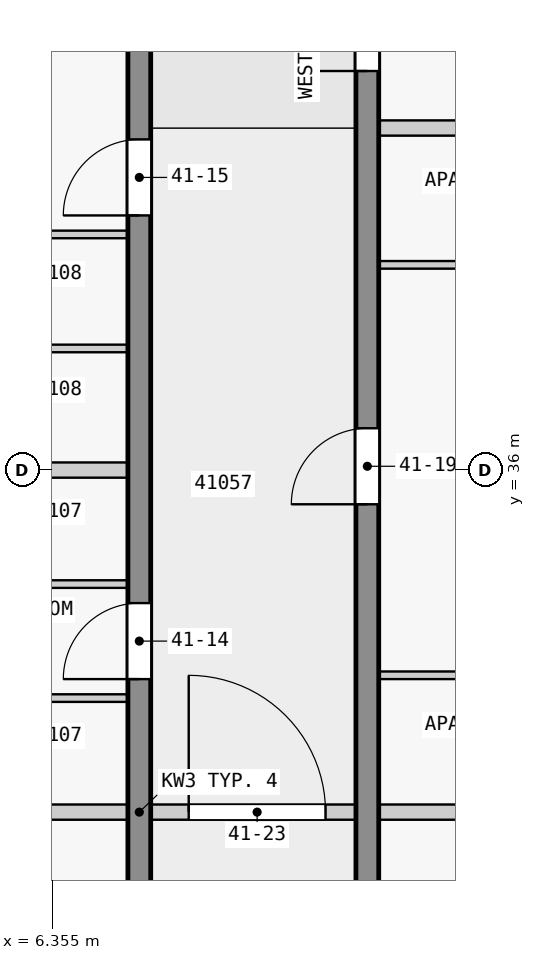
"""IFC4 building model, lengths in metres.
Left out: names, types, materials, properties, quantities, classifications, styles, units other than length and angle.
Written with IfcOpenShell. Run it as: python <this file> out.ifc"""

import sys

from ifc_helpers import new_model, si_unit, direction, frame, frame_2d, origin, place, context, subcontext, project, spatial, rectangle, extrude, element, fill, save


model = new_model("IFC4")
c1 = context("Model", 3, precision=1e-05, world=origin(), true_north=direction((0.0, 1.0)))
c2 = subcontext(c1, "Body", "Model", "MODEL_VIEW")
j1 = project(units=[si_unit("LENGTHUNIT", "METRE"), si_unit("PLANEANGLEUNIT", "RADIAN")], contexts=[c1])
p1 = place(None, origin())
s1 = spatial("IfcSite", under=j1, at=p1, CompositionType="ELEMENT")
p2 = place(p1, origin())
s2 = spatial("IfcBuilding", under=s1, at=p2, CompositionType="ELEMENT")
p3 = place(p2, frame((0.0, 0.0, 160.4)))
s3 = spatial("IfcBuildingStorey", under=s2, at=p3, CompositionType="ELEMENT", Elevation=160.4)
p4 = place(p3, frame((7.5, 18.0, 0.0), z_axis=(0.0, 0.0, 1.0), x_axis=(0.0, 1.0, 0.0)))
e1 = element("IfcWall", 1, at=p4, inside=s3, PredefinedType="SHEAR", context=c2, shape_type="SweptSolid", body=[
    extrude(rectangle(XDim=27.0, YDim=0.3, at=frame_2d((13.5, 0.0))), origin(), (0.0, 0.0, 1.0), 3.25),
])
p5 = place(p4, frame((1.75, 0.0, 0.0)))
e2 = element("IfcOpeningElement", 2, at=p5, cuts=e1, PredefinedType="OPENING", context=c2, shape_type="SweptSolid", body=[
    extrude(rectangle(XDim=1.0, YDim=2.1, at=frame_2d((0.5, 1.05))), frame((0.0, 0.16, 0.0), z_axis=(0.0, -1.0, 0.0), x_axis=(1.0, 0.0, 0.0)), (0.0, 0.0, 1.0), 0.32),
])
p6 = place(p4, frame((6.25, 0.0, 0.0)))
e3 = element("IfcOpeningElement", 3, at=p6, cuts=e1, PredefinedType="OPENING", context=c2, shape_type="SweptSolid", body=[
    extrude(rectangle(XDim=1.0, YDim=2.1, at=frame_2d((0.5, 1.05))), frame((0.0, 0.16, 0.0), z_axis=(0.0, -1.0, 0.0), x_axis=(1.0, 0.0, 0.0)), (0.0, 0.0, 1.0), 0.32),
])
p7 = place(p4, frame((10.75, 0.0, 0.0)))
e4 = element("IfcOpeningElement", 4, at=p7, cuts=e1, PredefinedType="OPENING", context=c2, shape_type="SweptSolid", body=[
    extrude(rectangle(XDim=1.0, YDim=2.1, at=frame_2d((0.5, 1.05))), frame((0.0, 0.16, 0.0), z_axis=(0.0, -1.0, 0.0), x_axis=(1.0, 0.0, 0.0)), (0.0, 0.0, 1.0), 0.32),
])
p8 = place(p4, frame((15.25, 0.0, 0.0)))
e5 = element("IfcOpeningElement", 5, at=p8, cuts=e1, PredefinedType="OPENING", context=c2, shape_type="SweptSolid", body=[
    extrude(rectangle(XDim=1.0, YDim=2.1, at=frame_2d((0.5, 1.05))), frame((0.0, 0.16, 0.0), z_axis=(0.0, -1.0, 0.0), x_axis=(1.0, 0.0, 0.0)), (0.0, 0.0, 1.0), 0.32),
])
p9 = place(p4, frame((21.35, 0.0, 0.0)))
e6 = element("IfcOpeningElement", 6, at=p9, cuts=e1, PredefinedType="OPENING", context=c2, shape_type="SweptSolid", body=[
    extrude(rectangle(XDim=1.0, YDim=2.1, at=frame_2d((0.5, 1.05))), frame((0.0, 0.16, 0.0), z_axis=(0.0, -1.0, 0.0), x_axis=(1.0, 0.0, 0.0)), (0.0, 0.0, 1.0), 0.32),
])
p10 = place(p3, frame((10.5, 18.0, 0.0), z_axis=(0.0, 0.0, 1.0), x_axis=(0.0, 1.0, 0.0)))
e7 = element("IfcWall", 7, at=p10, inside=s3, PredefinedType="SHEAR", context=c2, shape_type="SweptSolid", body=[
    extrude(rectangle(XDim=27.0, YDim=0.3, at=frame_2d((13.5, 0.0))), origin(), (0.0, 0.0, 1.0), 3.25),
])
p11 = place(p10, frame((1.75, 0.0, 0.0)))
e8 = element("IfcOpeningElement", 8, at=p11, cuts=e7, PredefinedType="OPENING", context=c2, shape_type="SweptSolid", body=[
    extrude(rectangle(XDim=1.0, YDim=2.1, at=frame_2d((0.5, 1.05))), frame((0.0, 0.16, 0.0), z_axis=(0.0, -1.0, 0.0), x_axis=(1.0, 0.0, 0.0)), (0.0, 0.0, 1.0), 0.32),
])
p12 = place(p10, frame((6.25, 0.0, 0.0)))
e9 = element("IfcOpeningElement", 9, at=p12, cuts=e7, PredefinedType="OPENING", context=c2, shape_type="SweptSolid", body=[
    extrude(rectangle(XDim=1.0, YDim=2.1, at=frame_2d((0.5, 1.05))), frame((0.0, 0.16, 0.0), z_axis=(0.0, -1.0, 0.0), x_axis=(1.0, 0.0, 0.0)), (0.0, 0.0, 1.0), 0.32),
])
p13 = place(p10, frame((10.35, 0.0, 0.0)))
e10 = element("IfcOpeningElement", 10, at=p13, cuts=e7, PredefinedType="OPENING", context=c2, shape_type="SweptSolid", body=[
    extrude(rectangle(XDim=1.8, YDim=2.1, at=frame_2d((0.9, 1.05))), frame((0.0, 0.16, 0.0), z_axis=(0.0, -1.0, 0.0), x_axis=(1.0, 0.0, 0.0)), (0.0, 0.0, 1.0), 0.32),
])
p14 = place(p10, frame((17.55, 0.0, 0.0)))
e11 = element("IfcOpeningElement", 11, at=p14, cuts=e7, PredefinedType="OPENING", context=c2, shape_type="SweptSolid", body=[
    extrude(rectangle(XDim=1.0, YDim=2.1, at=frame_2d((0.5, 1.05))), frame((0.0, 0.16, 0.0), z_axis=(0.0, -1.0, 0.0), x_axis=(1.0, 0.0, 0.0)), (0.0, 0.0, 1.0), 0.32),
])
p15 = place(p10, frame((23.25, 0.0, 0.0)))
e12 = element("IfcOpeningElement", 12, at=p15, cuts=e7, PredefinedType="OPENING", context=c2, shape_type="SweptSolid", body=[
    extrude(rectangle(XDim=0.9, YDim=2.1, at=frame_2d((0.45, 1.05))), frame((0.0, 0.16, 0.0), z_axis=(0.0, -1.0, 0.0), x_axis=(1.0, 0.0, 0.0)), (0.0, 0.0, 1.0), 0.32),
])
p16 = place(p10, frame((25.45, 0.0, 0.0)))
e13 = element("IfcOpeningElement", 13, at=p16, cuts=e7, PredefinedType="OPENING", context=c2, shape_type="SweptSolid", body=[
    extrude(rectangle(XDim=1.0, YDim=2.1, at=frame_2d((0.5, 1.05))), frame((0.0, 0.16, 0.0), z_axis=(0.0, -1.0, 0.0), x_axis=(1.0, 0.0, 0.0)), (0.0, 0.0, 1.0), 0.32),
])
for number, where, z_axis, x_axis in (
    (14, (7.35, 31.5, 0.0), (0.0, 0.0, 1.0), (-1.0, 0.0, 0.0)),
    (15, (17.85, 31.5, 0.0), (0.0, 0.0, 1.0), (-1.0, 0.0, 0.0)),
):
    element("IfcWall", number, at=place(p3, frame(where, z_axis=z_axis, x_axis=x_axis)), inside=s3, PredefinedType="PARTITIONING", context=c2, shape_type="SweptSolid", body=[
        extrude(rectangle(XDim=7.2, YDim=0.2, at=frame_2d((3.6, 0.0))), origin(), (0.0, 0.0, 1.0), 3.25),
    ])
p17 = place(p3, frame((7.35, 33.0, 0.0), z_axis=(0.0, 0.0, 1.0), x_axis=(-1.0, 0.0, 0.0)))
e16 = element("IfcWall", 16, at=p17, inside=s3, PredefinedType="PARTITIONING", context=c2, shape_type="SweptSolid", body=[
    extrude(rectangle(XDim=3.4, YDim=0.1, at=frame_2d((1.7, 0.0))), origin(), (0.0, 0.0, 1.0), 3.25),
])
p18 = place(p17, frame((1.25, 0.0, 0.0)))
e17 = element("IfcOpeningElement", 17, at=p18, cuts=e16, PredefinedType="OPENING", context=c2, shape_type="SweptSolid", body=[
    extrude(rectangle(XDim=0.9, YDim=2.1, at=frame_2d((0.45, 1.05))), frame((0.0, 0.06, 0.0), z_axis=(0.0, -1.0, 0.0), x_axis=(1.0, 0.0, 0.0)), (0.0, 0.0, 1.0), 0.12),
])
p19 = place(p3, frame((14.05, 33.3, 0.0), z_axis=(0.0, 0.0, 1.0), x_axis=(-1.0, 0.0, 0.0)))
e18 = element("IfcWall", 18, at=p19, inside=s3, PredefinedType="PARTITIONING", context=c2, shape_type="SweptSolid", body=[
    extrude(rectangle(XDim=3.4, YDim=0.1, at=frame_2d((1.7, 0.0))), origin(), (0.0, 0.0, 1.0), 3.25),
])
p20 = place(p19, frame((1.25, 0.0, 0.0)))
e19 = element("IfcOpeningElement", 19, at=p20, cuts=e18, PredefinedType="OPENING", context=c2, shape_type="SweptSolid", body=[
    extrude(rectangle(XDim=0.9, YDim=2.1, at=frame_2d((0.45, 1.05))), frame((0.0, 0.06, 0.0), z_axis=(0.0, -1.0, 0.0), x_axis=(1.0, 0.0, 0.0)), (0.0, 0.0, 1.0), 0.12),
])
p21 = place(p3, frame((4.0, 34.5, 0.0), z_axis=(0.0, 0.0, 1.0), x_axis=(1.0, 0.0, 0.0)))
e20 = element("IfcWall", 20, at=p21, inside=s3, PredefinedType="PARTITIONING", context=c2, shape_type="SweptSolid", body=[
    extrude(rectangle(XDim=3.35, YDim=0.1, at=frame_2d((1.675, 0.0))), origin(), (0.0, 0.0, 1.0), 3.25),
])
p22 = place(p21, frame((1.25, 0.0, 0.0)))
e21 = element("IfcOpeningElement", 21, at=p22, cuts=e20, PredefinedType="OPENING", context=c2, shape_type="SweptSolid", body=[
    extrude(rectangle(XDim=0.9, YDim=2.1, at=frame_2d((0.45, 1.05))), frame((0.0, 0.06, 0.0), z_axis=(0.0, -1.0, 0.0), x_axis=(1.0, 0.0, 0.0)), (0.0, 0.0, 1.0), 0.12),
])
p23 = place(p3, frame((7.35, 36.0, 0.0), z_axis=(0.0, 0.0, 1.0), x_axis=(-1.0, 0.0, 0.0)))
e22 = element("IfcWall", 22, at=p23, inside=s3, PredefinedType="PARTITIONING", context=c2, shape_type="SweptSolid", body=[
    extrude(rectangle(XDim=3.4, YDim=0.2, at=frame_2d((1.7, 0.0))), origin(), (0.0, 0.0, 1.0), 3.25),
])
p24 = place(p3, frame((7.35, 37.6, 0.0), z_axis=(0.0, 0.0, 1.0), x_axis=(-1.0, 0.0, 0.0)))
e23 = element("IfcWall", 23, at=p24, inside=s3, PredefinedType="PARTITIONING", context=c2, shape_type="SweptSolid", body=[
    extrude(rectangle(XDim=3.35, YDim=0.1, at=frame_2d((1.675, 0.0))), origin(), (0.0, 0.0, 1.0), 3.25),
])
p25 = place(p3, frame((10.65, 38.7, 0.0), z_axis=(0.0, 0.0, 1.0), x_axis=(1.0, 0.0, 0.0)))
e24 = element("IfcWall", 24, at=p25, inside=s3, PredefinedType="PARTITIONING", context=c2, shape_type="SweptSolid", body=[
    extrude(rectangle(XDim=3.4, YDim=0.1, at=frame_2d((1.7, 0.0))), origin(), (0.0, 0.0, 1.0), 3.25),
])
p26 = place(p25, frame((1.25, 0.0, 0.0)))
e25 = element("IfcOpeningElement", 25, at=p26, cuts=e24, PredefinedType="OPENING", context=c2, shape_type="SweptSolid", body=[
    extrude(rectangle(XDim=0.9, YDim=2.1, at=frame_2d((0.45, 1.05))), frame((0.0, 0.06, 0.0), z_axis=(0.0, -1.0, 0.0), x_axis=(1.0, 0.0, 0.0)), (0.0, 0.0, 1.0), 0.12),
])
p27 = place(p3, frame((7.35, 39.1, 0.0), z_axis=(0.0, 0.0, 1.0), x_axis=(-1.0, 0.0, 0.0)))
e26 = element("IfcWall", 26, at=p27, inside=s3, PredefinedType="PARTITIONING", context=c2, shape_type="SweptSolid", body=[
    extrude(rectangle(XDim=3.35, YDim=0.1, at=frame_2d((1.675, 0.0))), origin(), (0.0, 0.0, 1.0), 3.25),
])
p28 = place(p27, frame((1.25, 0.0, 0.0)))
e27 = element("IfcOpeningElement", 27, at=p28, cuts=e26, PredefinedType="OPENING", context=c2, shape_type="SweptSolid", body=[
    extrude(rectangle(XDim=0.9, YDim=2.1, at=frame_2d((0.45, 1.05))), frame((0.0, 0.06, 0.0), z_axis=(0.0, -1.0, 0.0), x_axis=(1.0, 0.0, 0.0)), (0.0, 0.0, 1.0), 0.12),
])
p29 = place(p3, frame((18.08, 40.5, 0.0), z_axis=(0.0, 0.0, 1.0), x_axis=(-1.0, 0.0, 0.0)))
e28 = element("IfcWall", 28, at=p29, inside=s3, PredefinedType="PARTITIONING", context=c2, shape_type="SweptSolid", body=[
    extrude(rectangle(XDim=7.43, YDim=0.2, at=frame_2d((3.715, 0.0))), origin(), (0.0, 0.0, 1.0), 3.25),
])
p30 = place(p3, frame((7.45, 31.5, 0.0), z_axis=(0.0, 0.0, 1.0), x_axis=(1.0, 0.0, 0.0)))
e29 = element("IfcWall", 29, at=p30, inside=s3, PredefinedType="PARTITIONING", context=c2, shape_type="SweptSolid", body=[
    extrude(rectangle(XDim=3.1, YDim=0.2, at=frame_2d((1.55, 0.0))), origin(), (0.0, 0.0, 1.0), 3.25),
])
p31 = place(p30, frame((0.7, 0.0, 0.0)))
e30 = element("IfcOpeningElement", 30, at=p31, cuts=e29, PredefinedType="OPENING", context=c2, shape_type="SweptSolid", body=[
    extrude(rectangle(XDim=1.8, YDim=2.1, at=frame_2d((0.9, 1.05))), frame((0.0, 0.11, 0.0), z_axis=(0.0, -1.0, 0.0), x_axis=(1.0, 0.0, 0.0)), (0.0, 0.0, 1.0), 0.22),
])
p32 = place(p8, origin())
e31 = element("IfcDoor", 31, at=p32, inside=s3, OperationType="SINGLE_SWING_RIGHT", PredefinedType="DOOR", context=c2, shape_type="SweptSolid", body=[
    extrude(rectangle(XDim=1.0, YDim=2.1, at=frame_2d((0.5, 1.05))), frame((0.0, 0.025, 0.0), z_axis=(0.0, -1.0, 0.0), x_axis=(1.0, 0.0, 0.0)), (0.0, 0.0, 1.0), 0.05),
])
fill(e5, e31)
p33 = place(p9, origin())
e32 = element("IfcDoor", 32, at=p33, inside=s3, OperationType="SINGLE_SWING_RIGHT", PredefinedType="DOOR", context=c2, shape_type="SweptSolid", body=[
    extrude(rectangle(XDim=1.0, YDim=2.1, at=frame_2d((0.5, 1.05))), frame((0.0, 0.025, 0.0), z_axis=(0.0, -1.0, 0.0), x_axis=(1.0, 0.0, 0.0)), (0.0, 0.0, 1.0), 0.05),
])
fill(e6, e32)
p34 = place(p14, origin())
e33 = element("IfcDoor", 33, at=p34, inside=s3, OperationType="SINGLE_SWING_RIGHT", PredefinedType="DOOR", context=c2, shape_type="SweptSolid", body=[
    extrude(rectangle(XDim=1.0, YDim=2.1, at=frame_2d((0.5, 1.05))), frame((0.0, 0.025, 0.0), z_axis=(0.0, -1.0, 0.0), x_axis=(1.0, 0.0, 0.0)), (0.0, 0.0, 1.0), 0.05),
])
fill(e11, e33)
p35 = place(p15, origin())
e34 = element("IfcDoor", 34, at=p35, inside=s3, OperationType="SINGLE_SWING_RIGHT", PredefinedType="DOOR", context=c2, shape_type="SweptSolid", body=[
    extrude(rectangle(XDim=0.9, YDim=2.1, at=frame_2d((0.45, 1.05))), frame((0.0, 0.025, 0.0), z_axis=(0.0, -1.0, 0.0), x_axis=(1.0, 0.0, 0.0)), (0.0, 0.0, 1.0), 0.05),
])
fill(e12, e34)
p36 = place(p31, origin())
e35 = element("IfcDoor", 35, at=p36, inside=s3, OperationType="SINGLE_SWING_RIGHT", PredefinedType="DOOR", context=c2, shape_type="SweptSolid", body=[
    extrude(rectangle(XDim=1.8, YDim=2.1, at=frame_2d((0.9, 1.05))), frame((0.0, 0.025, 0.0), z_axis=(0.0, -1.0, 0.0), x_axis=(1.0, 0.0, 0.0)), (0.0, 0.0, 1.0), 0.05),
])
fill(e30, e35)
save(model, sys.argv[1])
